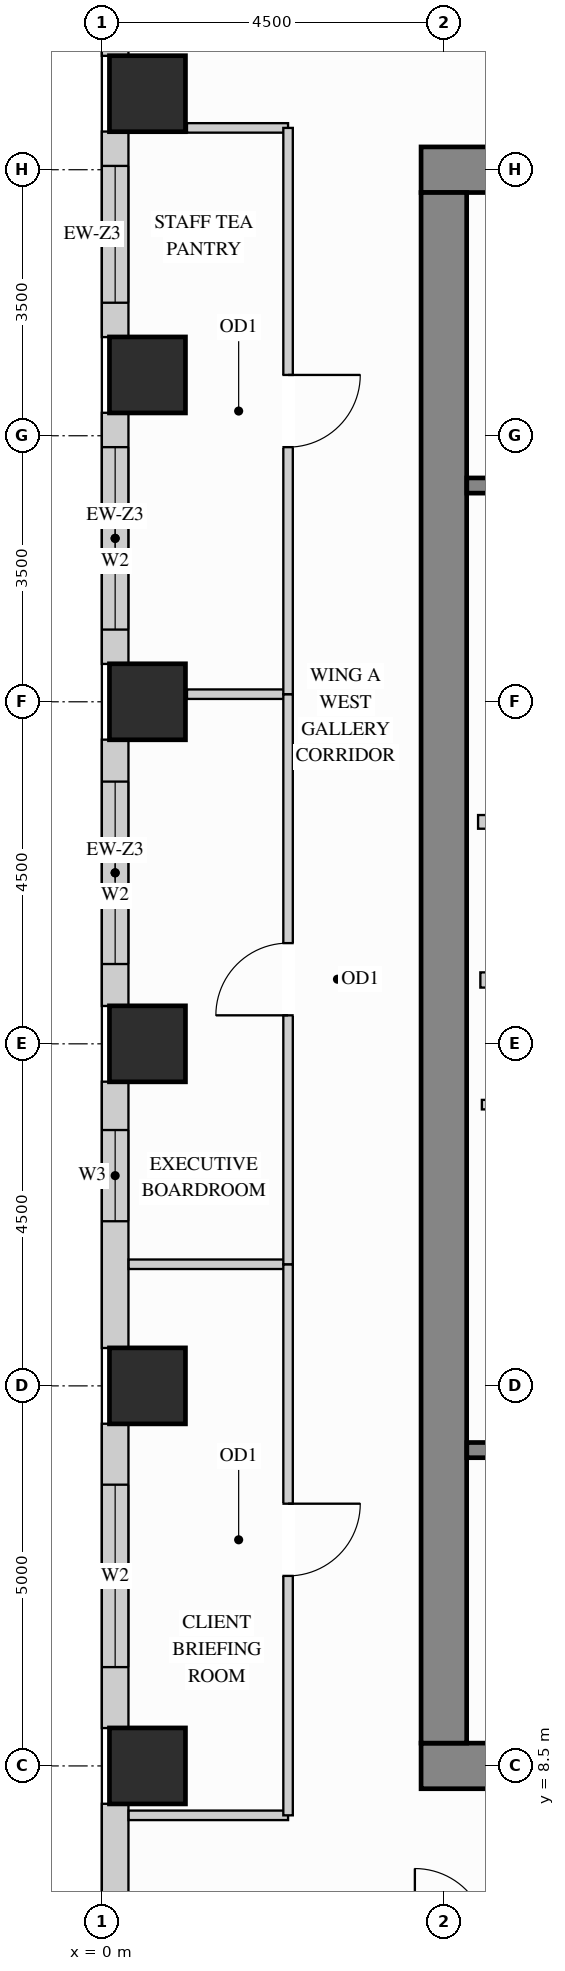
"""IFC4 building model, lengths in metres.
Left out: names, types, materials, properties, quantities, classifications, styles, units other than length and angle.
Written with IfcOpenShell. Run it as: python <this file> out.ifc"""

import sys

from ifc_helpers import new_model, si_unit, direction, frame, frame_2d, origin, origin_2d, place, context, subcontext, project, spatial, rectangle, extrude, source, transform, mapped, element, fill, save


model = new_model("IFC4")
c1 = context("Model", 3, precision=1e-05, world=origin(), true_north=direction((0.0, 1.0)))
c2 = subcontext(c1, "Body", "Model", "MODEL_VIEW")
j1 = project(units=[si_unit("LENGTHUNIT", "METRE"), si_unit("PLANEANGLEUNIT", "RADIAN")], contexts=[c1])
p1 = place(None, origin())
s1 = spatial("IfcSite", under=j1, at=p1, CompositionType="ELEMENT")
p2 = place(p1, origin())
s2 = spatial("IfcBuilding", under=s1, at=p2, CompositionType="ELEMENT")
p3 = place(p2, frame((0.0, 0.0, 204.3)))
s3 = spatial("IfcBuildingStorey", under=s2, at=p3, CompositionType="ELEMENT", Elevation=204.3)
m1 = source(origin(), c2, "Body", "SweptSolid", [
    extrude(rectangle(XDim=1.0, YDim=1.0, at=origin_2d()), origin(), (0.0, 0.0, 1.0), 3.32),
])
for number, where, z_axis, x_axis in (
    (1, (0.6, 13.5, 0.0), (0.0, 0.0, 1.0), (1.0, 0.0, 0.0)),
    (2, (0.6, 18.0, 0.0), (0.0, 0.0, 1.0), (1.0, 0.0, 0.0)),
    (3, (0.6, 22.5, 0.0), (0.0, 0.0, 1.0), (1.0, 0.0, 0.0)),
    (4, (0.6, 26.8, 0.0), (0.0, 0.0, 1.0), (1.0, 0.0, 0.0)),
    (5, (0.6, 30.5, 0.0), (0.0, 0.0, 1.0), (1.0, 0.0, 0.0)),
    (6, (0.6, 8.5, 0.0), (0.0, 0.0, 1.0), (1.0, 0.0, 0.0)),
):
    element("IfcColumn", number, at=place(p3, frame(where, z_axis=z_axis, x_axis=x_axis)), inside=s3, PredefinedType="COLUMN", context=c2, shape_type="MappedRepresentation", body=[
        mapped(m1, transform((0.0, 0.0, 0.0), x_axis=(1.0, 0.0, 0.0), y_axis=(0.0, 1.0, 0.0), z_axis=(0.0, 0.0, 1.0))),
    ])
m2 = source(origin(), c2, "Body", "SweptSolid", [
    extrude(rectangle(XDim=10.6, YDim=0.6, at=frame_2d((5.3, 0.0))), origin(), (0.0, 0.0, 1.0), 3.32),
])
for number, where, z_axis, x_axis in (
    (7, (4.2, 29.5, 0.0), (0.0, 0.0, 1.0), (1.0, 0.0, 0.0)),
    (8, (4.2, 8.5, 0.0), (0.0, 0.0, 1.0), (1.0, 0.0, 0.0)),
):
    element("IfcWall", number, at=place(p3, frame(where, z_axis=z_axis, x_axis=x_axis)), inside=s3, PredefinedType="SHEAR", context=c2, shape_type="MappedRepresentation", body=[
        mapped(m2, transform((0.0, 0.0, 0.0), x_axis=(1.0, 0.0, 0.0), y_axis=(0.0, 1.0, 0.0), z_axis=(0.0, 0.0, 1.0))),
    ])
m3 = source(origin(), c2, "Body", "SweptSolid", [
    extrude(rectangle(XDim=20.4, YDim=0.6, at=frame_2d((10.2, 0.0))), origin(), (0.0, 0.0, 1.0), 3.32),
])
p4 = place(p3, frame((4.5, 8.8, 0.0), z_axis=(0.0, 0.0, 1.0), x_axis=(0.0, 1.0, 0.0)))
e9 = element("IfcWall", 9, at=p4, inside=s3, PredefinedType="SHEAR", context=c2, shape_type="MappedRepresentation", body=[
    mapped(m3, transform((0.0, 0.0, 0.0), x_axis=(1.0, 0.0, 0.0), y_axis=(0.0, 1.0, 0.0), z_axis=(0.0, 0.0, 1.0))),
])
p5 = place(p3, frame((0.175, 34.502, 0.0), z_axis=(0.0, 0.0, 1.0), x_axis=(0.0, -1.0, 0.0)))
e10 = element("IfcWall", 10, at=p5, inside=s3, PredefinedType="SOLIDWALL", context=c2, shape_type="SweptSolid", body=[
    extrude(rectangle(XDim=3.504, YDim=0.35, at=frame_2d((1.752, 0.0))), origin(), (0.0, 0.0, 1.0), 2.532),
])
p6 = place(p5, frame((0.611, 0.0, 0.78)))
e11 = element("IfcOpeningElement", 11, at=p6, cuts=e10, PredefinedType="OPENING", context=c2, shape_type="SweptSolid", body=[
    extrude(rectangle(XDim=1.8, YDim=1.572, at=frame_2d((0.9, 0.786))), frame((0.0, 0.185, 0.0), z_axis=(0.0, -1.0, 0.0), x_axis=(1.0, 0.0, 0.0)), (0.0, 0.0, 1.0), 0.37),
])
p7 = place(p3, frame((0.175, 30.002, 0.0), z_axis=(0.0, 0.0, 1.0), x_axis=(0.0, -1.0, 0.0)))
e12 = element("IfcWall", 12, at=p7, inside=s3, PredefinedType="SOLIDWALL", context=c2, shape_type="SweptSolid", body=[
    extrude(rectangle(XDim=2.704, YDim=0.35, at=frame_2d((1.352, 0.0))), origin(), (0.0, 0.0, 1.0), 2.532),
])
p8 = place(p7, frame((0.452, 0.0, 0.78)))
e13 = element("IfcOpeningElement", 13, at=p8, cuts=e12, PredefinedType="OPENING", context=c2, shape_type="SweptSolid", body=[
    extrude(rectangle(XDim=1.8, YDim=1.572, at=frame_2d((0.9, 0.786))), frame((0.0, 0.185, 0.0), z_axis=(0.0, -1.0, 0.0), x_axis=(1.0, 0.0, 0.0)), (0.0, 0.0, 1.0), 0.37),
])
p9 = place(p3, frame((0.175, 26.302, 0.0), z_axis=(0.0, 0.0, 1.0), x_axis=(0.0, -1.0, 0.0)))
e14 = element("IfcWall", 14, at=p9, inside=s3, PredefinedType="SOLIDWALL", context=c2, shape_type="SweptSolid", body=[
    extrude(rectangle(XDim=3.304, YDim=0.35, at=frame_2d((1.652, 0.0))), origin(), (0.0, 0.0, 1.0), 2.532),
])
p10 = place(p9, frame((0.452, 0.0, 0.78)))
e15 = element("IfcOpeningElement", 15, at=p10, cuts=e14, PredefinedType="OPENING", context=c2, shape_type="SweptSolid", body=[
    extrude(rectangle(XDim=2.4, YDim=1.572, at=frame_2d((1.2, 0.786))), frame((0.0, 0.185, 0.0), z_axis=(0.0, -1.0, 0.0), x_axis=(1.0, 0.0, 0.0)), (0.0, 0.0, 1.0), 0.37),
])
p11 = place(p3, frame((0.175, 22.002, 0.0), z_axis=(0.0, 0.0, 1.0), x_axis=(0.0, -1.0, 0.0)))
e16 = element("IfcWall", 16, at=p11, inside=s3, PredefinedType="SOLIDWALL", context=c2, shape_type="SweptSolid", body=[
    extrude(rectangle(XDim=3.504, YDim=0.35, at=frame_2d((1.752, 0.0))), origin(), (0.0, 0.0, 1.0), 2.532),
])
p12 = place(p11, frame((0.552, 0.0, 0.78)))
e17 = element("IfcOpeningElement", 17, at=p12, cuts=e16, PredefinedType="OPENING", context=c2, shape_type="SweptSolid", body=[
    extrude(rectangle(XDim=2.4, YDim=1.572, at=frame_2d((1.2, 0.786))), frame((0.0, 0.185, 0.0), z_axis=(0.0, -1.0, 0.0), x_axis=(1.0, 0.0, 0.0)), (0.0, 0.0, 1.0), 0.37),
])
p13 = place(p3, frame((0.175, 17.502, 0.0), z_axis=(0.0, 0.0, 1.0), x_axis=(0.0, -1.0, 0.0)))
e18 = element("IfcWall", 18, at=p13, inside=s3, PredefinedType="SOLIDWALL", context=c2, shape_type="SweptSolid", body=[
    extrude(rectangle(XDim=3.504, YDim=0.35, at=frame_2d((1.752, 0.0))), origin(), (0.0, 0.0, 1.0), 2.532),
])
p14 = place(p13, frame((0.636, 0.0, 0.78)))
e19 = element("IfcOpeningElement", 19, at=p14, cuts=e18, PredefinedType="OPENING", context=c2, shape_type="SweptSolid", body=[
    extrude(rectangle(XDim=1.2, YDim=1.572, at=frame_2d((0.6, 0.786))), frame((0.0, 0.185, 0.0), z_axis=(0.0, -1.0, 0.0), x_axis=(1.0, 0.0, 0.0)), (0.0, 0.0, 1.0), 0.37),
])
p15 = place(p3, frame((0.175, 13.002, 0.0), z_axis=(0.0, 0.0, 1.0), x_axis=(0.0, -1.0, 0.0)))
e20 = element("IfcWall", 20, at=p15, inside=s3, PredefinedType="SOLIDWALL", context=c2, shape_type="SweptSolid", body=[
    extrude(rectangle(XDim=4.004, YDim=0.35, at=frame_2d((2.002, 0.0))), origin(), (0.0, 0.0, 1.0), 2.532),
])
p16 = place(p15, frame((0.802, 0.0, 0.78)))
e21 = element("IfcOpeningElement", 21, at=p16, cuts=e20, PredefinedType="OPENING", context=c2, shape_type="SweptSolid", body=[
    extrude(rectangle(XDim=2.4, YDim=1.572, at=frame_2d((1.2, 0.786))), frame((0.0, 0.185, 0.0), z_axis=(0.0, -1.0, 0.0), x_axis=(1.0, 0.0, 0.0)), (0.0, 0.0, 1.0), 0.37),
])
p17 = place(p3, frame((0.175, 8.002, 0.0), z_axis=(0.0, 0.0, 1.0), x_axis=(0.0, -1.0, 0.0)))
e22 = element("IfcWall", 22, at=p17, inside=s3, PredefinedType="SOLIDWALL", context=c2, shape_type="SweptSolid", body=[
    extrude(rectangle(XDim=4.004, YDim=0.35, at=frame_2d((2.002, 0.0))), origin(), (0.0, 0.0, 1.0), 2.532),
])
p18 = place(p17, frame((2.268, 0.0, 0.78)))
e23 = element("IfcOpeningElement", 23, at=p18, cuts=e22, PredefinedType="OPENING", context=c2, shape_type="SweptSolid", body=[
    extrude(rectangle(XDim=1.2, YDim=1.572, at=frame_2d((0.6, 0.786))), frame((0.0, 0.185, 0.0), z_axis=(0.0, -1.0, 0.0), x_axis=(1.0, 0.0, 0.0)), (0.0, 0.0, 1.0), 0.37),
])
m4 = source(origin(), c2, "Body", "SweptSolid", [
    extrude(rectangle(XDim=2.2, YDim=0.18, at=frame_2d((1.1, 0.0))), origin(), (0.0, 0.0, 1.0), 3.305),
])
p19 = place(p3, frame((4.95, 20.92, 0.0), z_axis=(0.0, 0.0, 1.0), x_axis=(1.0, 0.0, 0.0)))
e24 = element("IfcWall", 24, at=p19, inside=s3, PredefinedType="PARTITIONING", context=c2, shape_type="MappedRepresentation", body=[
    mapped(m4, transform((0.0, 0.0, 0.0), x_axis=(1.0, 0.0, 0.0), y_axis=(0.0, 1.0, 0.0), z_axis=(0.0, 0.0, 1.0))),
])
p20 = place(p3, frame((5.0, 17.2, 0.0), z_axis=(0.0, 0.0, 1.0), x_axis=(1.0, 0.0, 0.0)))
e25 = element("IfcWall", 25, at=p20, inside=s3, PredefinedType="PARTITIONING", context=c2, shape_type="SweptSolid", body=[
    extrude(rectangle(XDim=2.4, YDim=0.125, at=frame_2d((1.2, 0.0))), origin(), (0.0, 0.0, 1.0), 3.305),
])
p21 = place(p20, frame((0.7, 0.0, 0.0)))
e26 = element("IfcOpeningElement", 26, at=p21, cuts=e25, PredefinedType="OPENING", context=c2, shape_type="SweptSolid", body=[
    extrude(rectangle(XDim=0.85, YDim=2.1, at=frame_2d((0.425, 1.05))), frame((0.0, 0.073, 0.0), z_axis=(0.0, -1.0, 0.0), x_axis=(1.0, 0.0, 0.0)), (0.0, 0.0, 1.0), 0.145),
])
m5 = source(origin(), c2, "Body", "SweptSolid", [
    extrude(rectangle(XDim=1.33, YDim=0.125, at=frame_2d((0.665, 0.0))), origin(), (0.0, 0.0, 1.0), 3.305),
])
p22 = place(p3, frame((1.12, 30.05, 0.0), z_axis=(0.0, 0.0, 1.0), x_axis=(1.0, 0.0, 0.0)))
e27 = element("IfcWall", 27, at=p22, inside=s3, PredefinedType="PARTITIONING", context=c2, shape_type="MappedRepresentation", body=[
    mapped(m5, transform((0.0, 0.0, 0.0), x_axis=(1.0, 0.0, 0.0), y_axis=(0.0, 1.0, 0.0), z_axis=(0.0, 0.0, 1.0))),
])
m6 = source(origin(), c2, "Body", "SweptSolid", [
    extrude(rectangle(XDim=2.098, YDim=0.125, at=frame_2d((1.049, 0.0))), origin(), (0.0, 0.0, 1.0), 3.305),
])
for number, where, z_axis, x_axis in (
    (28, (0.352, 7.85, 0.0), (0.0, 0.0, 1.0), (1.0, 0.0, 0.0)),
    (29, (0.352, 15.1, 0.0), (0.0, 0.0, 1.0), (1.0, 0.0, 0.0)),
):
    element("IfcWall", number, at=place(p3, frame(where, z_axis=z_axis, x_axis=x_axis)), inside=s3, PredefinedType="PARTITIONING", context=c2, shape_type="MappedRepresentation", body=[
        mapped(m6, transform((0.0, 0.0, 0.0), x_axis=(1.0, 0.0, 0.0), y_axis=(0.0, 1.0, 0.0), z_axis=(0.0, 0.0, 1.0))),
    ])
p23 = place(p3, frame((1.12, 22.6, 0.0), z_axis=(0.0, 0.0, 1.0), x_axis=(1.0, 0.0, 0.0)))
e30 = element("IfcWall", 30, at=p23, inside=s3, PredefinedType="PARTITIONING", context=c2, shape_type="MappedRepresentation", body=[
    mapped(m5, transform((0.0, 0.0, 0.0), x_axis=(1.0, 0.0, 0.0), y_axis=(0.0, 1.0, 0.0), z_axis=(0.0, 0.0, 1.0))),
])
p24 = place(p3, frame((2.45, 7.85, 0.0), z_axis=(0.0, 0.0, 1.0), x_axis=(0.0, 1.0, 0.0)))
e31 = element("IfcWall", 31, at=p24, inside=s3, PredefinedType="PARTITIONING", context=c2, shape_type="SweptSolid", body=[
    extrude(rectangle(XDim=7.25, YDim=0.125, at=frame_2d((3.625, 0.0))), origin(), (0.0, 0.0, 1.0), 3.305),
])
p25 = place(p24, frame((3.15, 0.0, 0.0)))
e32 = element("IfcOpeningElement", 32, at=p25, cuts=e31, PredefinedType="OPENING", context=c2, shape_type="SweptSolid", body=[
    extrude(rectangle(XDim=0.95, YDim=2.15, at=frame_2d((0.475, 1.075))), frame((0.0, 0.073, 0.0), z_axis=(0.0, -1.0, 0.0), x_axis=(1.0, 0.0, 0.0)), (0.0, 0.0, 1.0), 0.145),
])
p26 = place(p3, frame((2.45, 15.1, 0.0), z_axis=(0.0, 0.0, 1.0), x_axis=(0.0, 1.0, 0.0)))
e33 = element("IfcWall", 33, at=p26, inside=s3, PredefinedType="PARTITIONING", context=c2, shape_type="SweptSolid", body=[
    extrude(rectangle(XDim=7.5, YDim=0.125, at=frame_2d((3.75, 0.0))), origin(), (0.0, 0.0, 1.0), 3.305),
])
p27 = place(p26, frame((3.275, 0.0, 0.0)))
e34 = element("IfcOpeningElement", 34, at=p27, cuts=e33, PredefinedType="OPENING", context=c2, shape_type="SweptSolid", body=[
    extrude(rectangle(XDim=0.95, YDim=2.15, at=frame_2d((0.475, 1.075))), frame((0.0, 0.073, 0.0), z_axis=(0.0, -1.0, 0.0), x_axis=(1.0, 0.0, 0.0)), (0.0, 0.0, 1.0), 0.145),
])
p28 = place(p3, frame((2.45, 22.6, 0.0), z_axis=(0.0, 0.0, 1.0), x_axis=(0.0, 1.0, 0.0)))
e35 = element("IfcWall", 35, at=p28, inside=s3, PredefinedType="PARTITIONING", context=c2, shape_type="SweptSolid", body=[
    extrude(rectangle(XDim=7.45, YDim=0.125, at=frame_2d((3.725, 0.0))), origin(), (0.0, 0.0, 1.0), 3.305),
])
p29 = place(p28, frame((3.25, 0.0, 0.0)))
e36 = element("IfcOpeningElement", 36, at=p29, cuts=e35, PredefinedType="OPENING", context=c2, shape_type="SweptSolid", body=[
    extrude(rectangle(XDim=0.95, YDim=2.15, at=frame_2d((0.475, 1.075))), frame((0.0, 0.073, 0.0), z_axis=(0.0, -1.0, 0.0), x_axis=(1.0, 0.0, 0.0)), (0.0, 0.0, 1.0), 0.145),
])
m7 = source(origin(), c2, "Body", "SweptSolid", [
    extrude(rectangle(XDim=2.09, YDim=0.2, at=frame_2d((1.045, 0.0))), origin(), (0.0, 0.0, 1.0), 3.305),
])
p30 = place(p3, frame((4.98, 18.84, 0.0), z_axis=(0.0, 0.0, 1.0), x_axis=(1.0, 0.0, 0.0)))
e37 = element("IfcWall", 37, at=p30, inside=s3, PredefinedType="PARTITIONING", context=c2, shape_type="MappedRepresentation", body=[
    mapped(m7, transform((0.0, 0.0, 0.0), x_axis=(1.0, 0.0, 0.0), y_axis=(0.0, 1.0, 0.0), z_axis=(0.0, 0.0, 1.0))),
])
p31 = place(p3, frame((4.802, 12.655, 0.0), z_axis=(0.0, 0.0, 1.0), x_axis=(1.0, 0.0, 0.0)))
e38 = element("IfcWall", 38, at=p31, inside=s3, PredefinedType="SHEAR", context=c2, shape_type="SweptSolid", body=[
    extrude(rectangle(XDim=7.603, YDim=0.2, at=frame_2d((3.802, 0.0))), origin(), (0.0, 0.0, 1.0), 3.32),
])
p32 = place(p31, frame((0.4, 0.0, 0.0)))
e39 = element("IfcOpeningElement", 39, at=p32, cuts=e38, PredefinedType="OPENING", context=c2, shape_type="SweptSolid", body=[
    extrude(rectangle(XDim=1.1, YDim=2.15, at=frame_2d((0.55, 1.075))), frame((0.0, 0.11, 0.0), z_axis=(0.0, -1.0, 0.0), x_axis=(1.0, 0.0, 0.0)), (0.0, 0.0, 1.0), 0.22),
])
p33 = place(p3, frame((4.802, 25.345, 0.0), z_axis=(0.0, 0.0, 1.0), x_axis=(1.0, 0.0, 0.0)))
e40 = element("IfcWall", 40, at=p33, inside=s3, PredefinedType="SHEAR", context=c2, shape_type="SweptSolid", body=[
    extrude(rectangle(XDim=7.603, YDim=0.2, at=frame_2d((3.802, 0.0))), origin(), (0.0, 0.0, 1.0), 3.32),
])
p34 = place(p33, frame((0.4, 0.0, 0.0)))
e41 = element("IfcOpeningElement", 41, at=p34, cuts=e40, PredefinedType="OPENING", context=c2, shape_type="SweptSolid", body=[
    extrude(rectangle(XDim=1.1, YDim=2.15, at=frame_2d((0.55, 1.075))), frame((0.0, 0.11, 0.0), z_axis=(0.0, -1.0, 0.0), x_axis=(1.0, 0.0, 0.0)), (0.0, 0.0, 1.0), 0.22),
])
m8 = source(origin(), c2, "Body", "SweptSolid", [
    extrude(rectangle(XDim=0.95, YDim=2.15, at=frame_2d((0.475, 1.075))), frame((0.0, 0.025, 0.0), z_axis=(0.0, -1.0, 0.0), x_axis=(1.0, 0.0, 0.0)), (0.0, 0.0, 1.0), 0.05),
])
p35 = place(p25, origin())
e42 = element("IfcDoor", 42, at=p35, inside=s3, OperationType="SINGLE_SWING_RIGHT", PredefinedType="DOOR", context=c2, shape_type="MappedRepresentation", body=[
    mapped(m8, transform((0.0, 0.0, 0.0), x_axis=(1.0, 0.0, 0.0), y_axis=(0.0, 1.0, 0.0), z_axis=(0.0, 0.0, 1.0))),
])
fill(e32, e42)
p36 = place(p27, origin())
e43 = element("IfcDoor", 43, at=p36, inside=s3, OperationType="SINGLE_SWING_LEFT", PredefinedType="DOOR", context=c2, shape_type="MappedRepresentation", body=[
    mapped(m8, transform((0.0, 0.0, 0.0), x_axis=(1.0, 0.0, 0.0), y_axis=(0.0, 1.0, 0.0), z_axis=(0.0, 0.0, 1.0))),
])
fill(e34, e43)
p37 = place(p29, origin())
e44 = element("IfcDoor", 44, at=p37, inside=s3, OperationType="SINGLE_SWING_RIGHT", PredefinedType="DOOR", context=c2, shape_type="MappedRepresentation", body=[
    mapped(m8, transform((0.0, 0.0, 0.0), x_axis=(1.0, 0.0, 0.0), y_axis=(0.0, 1.0, 0.0), z_axis=(0.0, 0.0, 1.0))),
])
fill(e36, e44)
m9 = source(origin(), c2, "Body", "SweptSolid", [
    extrude(rectangle(XDim=1.8, YDim=1.572, at=frame_2d((0.9, 0.786))), frame((0.0, 0.03, 0.0), z_axis=(0.0, -1.0, 0.0), x_axis=(1.0, 0.0, 0.0)), (0.0, 0.0, 1.0), 0.06),
])
p38 = place(p8, origin())
e45 = element("IfcWindow", 45, at=p38, inside=s3, PartitioningType="SINGLE_PANEL", PredefinedType="WINDOW", context=c2, shape_type="MappedRepresentation", body=[
    mapped(m9, transform((0.0, 0.0, 0.0), x_axis=(1.0, 0.0, 0.0), y_axis=(0.0, 1.0, 0.0), z_axis=(0.0, 0.0, 1.0))),
])
fill(e13, e45)
m10 = source(origin(), c2, "Body", "SweptSolid", [
    extrude(rectangle(XDim=2.4, YDim=1.572, at=frame_2d((1.2, 0.786))), frame((0.0, 0.03, 0.0), z_axis=(0.0, -1.0, 0.0), x_axis=(1.0, 0.0, 0.0)), (0.0, 0.0, 1.0), 0.06),
])
p39 = place(p10, origin())
e46 = element("IfcWindow", 46, at=p39, inside=s3, PartitioningType="SINGLE_PANEL", PredefinedType="WINDOW", context=c2, shape_type="MappedRepresentation", body=[
    mapped(m10, transform((0.0, 0.0, 0.0), x_axis=(1.0, 0.0, 0.0), y_axis=(0.0, 1.0, 0.0), z_axis=(0.0, 0.0, 1.0))),
])
fill(e15, e46)
p40 = place(p12, origin())
e47 = element("IfcWindow", 47, at=p40, inside=s3, PartitioningType="SINGLE_PANEL", PredefinedType="WINDOW", context=c2, shape_type="MappedRepresentation", body=[
    mapped(m10, transform((0.0, 0.0, 0.0), x_axis=(1.0, 0.0, 0.0), y_axis=(0.0, 1.0, 0.0), z_axis=(0.0, 0.0, 1.0))),
])
fill(e17, e47)
p41 = place(p16, origin())
e48 = element("IfcWindow", 48, at=p41, inside=s3, PartitioningType="SINGLE_PANEL", PredefinedType="WINDOW", context=c2, shape_type="MappedRepresentation", body=[
    mapped(m10, transform((0.0, 0.0, 0.0), x_axis=(1.0, 0.0, 0.0), y_axis=(0.0, 1.0, 0.0), z_axis=(0.0, 0.0, 1.0))),
])
fill(e21, e48)
m11 = source(origin(), c2, "Body", "SweptSolid", [
    extrude(rectangle(XDim=1.2, YDim=1.572, at=frame_2d((0.6, 0.786))), frame((0.0, 0.03, 0.0), z_axis=(0.0, -1.0, 0.0), x_axis=(1.0, 0.0, 0.0)), (0.0, 0.0, 1.0), 0.06),
])
p42 = place(p14, origin())
e49 = element("IfcWindow", 49, at=p42, inside=s3, PartitioningType="SINGLE_PANEL", PredefinedType="WINDOW", context=c2, shape_type="MappedRepresentation", body=[
    mapped(m11, transform((0.0, 0.0, 0.0), x_axis=(1.0, 0.0, 0.0), y_axis=(0.0, 1.0, 0.0), z_axis=(0.0, 0.0, 1.0))),
])
fill(e19, e49)
save(model, sys.argv[1])
